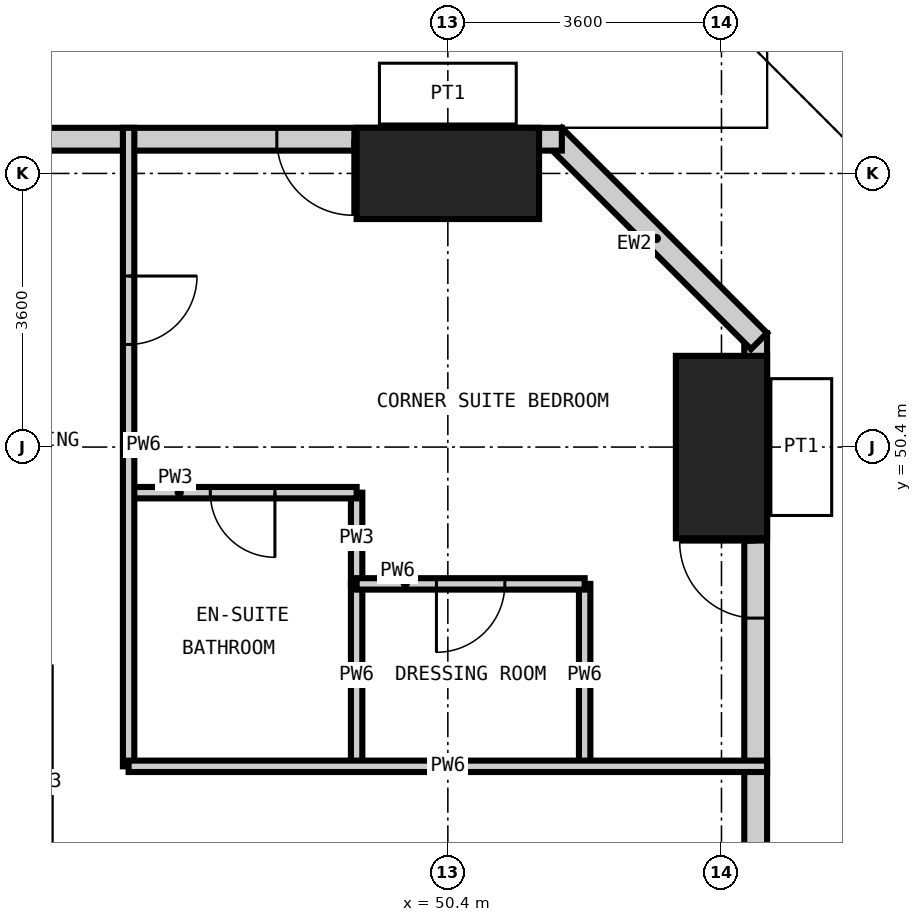
"""IFC4 building model, lengths in metres.
Left out: names, types, materials, properties, quantities, classifications, styles, units other than length and angle.
Written with IfcOpenShell. Run it as: python <this file> out.ifc"""

import sys

from ifc_helpers import new_model, si_unit, direction, frame, frame_2d, origin, origin_2d, place, context, subcontext, project, spatial, rectangle, extrude, element, fill, save


model = new_model("IFC4")
c1 = context("Model", 3, precision=1e-05, world=origin(), true_north=direction((0.0, 1.0)))
c2 = subcontext(c1, "Body", "Model", "MODEL_VIEW")
j1 = project(units=[si_unit("LENGTHUNIT", "METRE"), si_unit("PLANEANGLEUNIT", "RADIAN")], contexts=[c1])
p1 = place(None, origin())
s1 = spatial("IfcSite", under=j1, at=p1, CompositionType="ELEMENT")
p2 = place(p1, origin())
s2 = spatial("IfcBuilding", under=s1, at=p2, CompositionType="ELEMENT")
p3 = place(p2, frame((0.0, 0.0, 93.6)))
s3 = spatial("IfcBuildingStorey", under=s2, at=p3, CompositionType="ELEMENT", Elevation=93.6)
p4 = place(p3, frame((50.4, 54.0, -0.35), z_axis=(0.0, 0.0, 1.0), x_axis=(1.0, 0.0, 0.0)))
e1 = element("IfcColumn", 1, at=p4, inside=s3, PredefinedType="COLUMN", context=c2, shape_type="SweptSolid", body=[
    extrude(rectangle(XDim=2.4, YDim=1.2, at=origin_2d()), origin(), (0.0, 0.0, 1.0), 3.6),
])
p5 = place(p3, frame((54.0, 50.4, -0.35), z_axis=(0.0, 0.0, 1.0), x_axis=(1.0, 0.0, 0.0)))
e2 = element("IfcColumn", 2, at=p5, inside=s3, PredefinedType="COLUMN", context=c2, shape_type="SweptSolid", body=[
    extrude(rectangle(XDim=1.2, YDim=2.4, at=origin_2d()), origin(), (0.0, 0.0, 1.0), 3.6),
])
p6 = place(p3, frame((54.45, 2.7, 0.0), z_axis=(0.0, 0.0, 1.0), x_axis=(0.0, 1.0, 0.0)))
e3 = element("IfcWall", 3, at=p6, inside=s3, PredefinedType="SOLIDWALL", context=c2, shape_type="SweptSolid", body=[
    extrude(rectangle(XDim=49.2, YDim=0.3, at=frame_2d((24.6, 0.0))), origin(), (0.0, 0.0, 1.0), 3.25),
])
p7 = place(p6, frame((2.35, 0.0, 0.0)))
e4 = element("IfcOpeningElement", 4, at=p7, cuts=e3, PredefinedType="OPENING", context=c2, shape_type="SweptSolid", body=[
    extrude(rectangle(XDim=1.0, YDim=2.4, at=frame_2d((0.5, 1.2))), frame((0.0, 0.16, 0.0), z_axis=(0.0, -1.0, 0.0), x_axis=(1.0, 0.0, 0.0)), (0.0, 0.0, 1.0), 0.32),
])
p8 = place(p6, frame((0.3, 0.0, 0.6)))
e5 = element("IfcOpeningElement", 5, at=p8, cuts=e3, PredefinedType="OPENING", context=c2, shape_type="SweptSolid", body=[
    extrude(rectangle(XDim=1.8, YDim=2.1, at=frame_2d((0.9, 1.05))), frame((0.0, 0.16, 0.0), z_axis=(0.0, -1.0, 0.0), x_axis=(1.0, 0.0, 0.0)), (0.0, 0.0, 1.0), 0.32),
])
p9 = place(p6, frame((9.4, 0.0, 0.0)))
e6 = element("IfcOpeningElement", 6, at=p9, cuts=e3, PredefinedType="OPENING", context=c2, shape_type="SweptSolid", body=[
    extrude(rectangle(XDim=1.0, YDim=2.4, at=frame_2d((0.5, 1.2))), frame((0.0, 0.16, 0.0), z_axis=(0.0, -1.0, 0.0), x_axis=(1.0, 0.0, 0.0)), (0.0, 0.0, 1.0), 0.32),
])
p10 = place(p6, frame((7.0, 0.0, 0.6)))
e7 = element("IfcOpeningElement", 7, at=p10, cuts=e3, PredefinedType="OPENING", context=c2, shape_type="SweptSolid", body=[
    extrude(rectangle(XDim=1.8, YDim=2.1, at=frame_2d((0.9, 1.05))), frame((0.0, 0.16, 0.0), z_axis=(0.0, -1.0, 0.0), x_axis=(1.0, 0.0, 0.0)), (0.0, 0.0, 1.0), 0.32),
])
p11 = place(p6, frame((10.7, 0.0, 0.6)))
e8 = element("IfcOpeningElement", 8, at=p11, cuts=e3, PredefinedType="OPENING", context=c2, shape_type="SweptSolid", body=[
    extrude(rectangle(XDim=1.8, YDim=2.1, at=frame_2d((0.9, 1.05))), frame((0.0, 0.16, 0.0), z_axis=(0.0, -1.0, 0.0), x_axis=(1.0, 0.0, 0.0)), (0.0, 0.0, 1.0), 0.32),
])
p12 = place(p6, frame((17.8, 0.0, 0.0)))
e9 = element("IfcOpeningElement", 9, at=p12, cuts=e3, PredefinedType="OPENING", context=c2, shape_type="SweptSolid", body=[
    extrude(rectangle(XDim=1.0, YDim=2.4, at=frame_2d((0.5, 1.2))), frame((0.0, 0.16, 0.0), z_axis=(0.0, -1.0, 0.0), x_axis=(1.0, 0.0, 0.0)), (0.0, 0.0, 1.0), 0.32),
])
p13 = place(p6, frame((15.7, 0.0, 0.6)))
e10 = element("IfcOpeningElement", 10, at=p13, cuts=e3, PredefinedType="OPENING", context=c2, shape_type="SweptSolid", body=[
    extrude(rectangle(XDim=1.8, YDim=2.1, at=frame_2d((0.9, 1.05))), frame((0.0, 0.16, 0.0), z_axis=(0.0, -1.0, 0.0), x_axis=(1.0, 0.0, 0.0)), (0.0, 0.0, 1.0), 0.32),
])
p14 = place(p6, frame((19.4, 0.0, 0.6)))
e11 = element("IfcOpeningElement", 11, at=p14, cuts=e3, PredefinedType="OPENING", context=c2, shape_type="SweptSolid", body=[
    extrude(rectangle(XDim=1.8, YDim=2.1, at=frame_2d((0.9, 1.05))), frame((0.0, 0.16, 0.0), z_axis=(0.0, -1.0, 0.0), x_axis=(1.0, 0.0, 0.0)), (0.0, 0.0, 1.0), 0.32),
])
p15 = place(p6, frame((26.2, 0.0, 0.0)))
e12 = element("IfcOpeningElement", 12, at=p15, cuts=e3, PredefinedType="OPENING", context=c2, shape_type="SweptSolid", body=[
    extrude(rectangle(XDim=1.0, YDim=2.4, at=frame_2d((0.5, 1.2))), frame((0.0, 0.16, 0.0), z_axis=(0.0, -1.0, 0.0), x_axis=(1.0, 0.0, 0.0)), (0.0, 0.0, 1.0), 0.32),
])
p16 = place(p6, frame((23.8, 0.0, 0.6)))
e13 = element("IfcOpeningElement", 13, at=p16, cuts=e3, PredefinedType="OPENING", context=c2, shape_type="SweptSolid", body=[
    extrude(rectangle(XDim=1.8, YDim=2.1, at=frame_2d((0.9, 1.05))), frame((0.0, 0.16, 0.0), z_axis=(0.0, -1.0, 0.0), x_axis=(1.0, 0.0, 0.0)), (0.0, 0.0, 1.0), 0.32),
])
p17 = place(p6, frame((27.8, 0.0, 0.6)))
e14 = element("IfcOpeningElement", 14, at=p17, cuts=e3, PredefinedType="OPENING", context=c2, shape_type="SweptSolid", body=[
    extrude(rectangle(XDim=1.8, YDim=2.1, at=frame_2d((0.9, 1.05))), frame((0.0, 0.16, 0.0), z_axis=(0.0, -1.0, 0.0), x_axis=(1.0, 0.0, 0.0)), (0.0, 0.0, 1.0), 0.32),
])
p18 = place(p6, frame((34.6, 0.0, 0.0)))
e15 = element("IfcOpeningElement", 15, at=p18, cuts=e3, PredefinedType="OPENING", context=c2, shape_type="SweptSolid", body=[
    extrude(rectangle(XDim=1.0, YDim=2.4, at=frame_2d((0.5, 1.2))), frame((0.0, 0.16, 0.0), z_axis=(0.0, -1.0, 0.0), x_axis=(1.0, 0.0, 0.0)), (0.0, 0.0, 1.0), 0.32),
])
p19 = place(p6, frame((32.2, 0.0, 0.6)))
e16 = element("IfcOpeningElement", 16, at=p19, cuts=e3, PredefinedType="OPENING", context=c2, shape_type="SweptSolid", body=[
    extrude(rectangle(XDim=1.8, YDim=2.1, at=frame_2d((0.9, 1.05))), frame((0.0, 0.16, 0.0), z_axis=(0.0, -1.0, 0.0), x_axis=(1.0, 0.0, 0.0)), (0.0, 0.0, 1.0), 0.32),
])
p20 = place(p6, frame((35.9, 0.0, 0.6)))
e17 = element("IfcOpeningElement", 17, at=p20, cuts=e3, PredefinedType="OPENING", context=c2, shape_type="SweptSolid", body=[
    extrude(rectangle(XDim=1.8, YDim=2.1, at=frame_2d((0.9, 1.05))), frame((0.0, 0.16, 0.0), z_axis=(0.0, -1.0, 0.0), x_axis=(1.0, 0.0, 0.0)), (0.0, 0.0, 1.0), 0.32),
])
p21 = place(p6, frame((40.9, 0.0, 0.0)))
e18 = element("IfcOpeningElement", 18, at=p21, cuts=e3, PredefinedType="OPENING", context=c2, shape_type="SweptSolid", body=[
    extrude(rectangle(XDim=1.0, YDim=2.4, at=frame_2d((0.5, 1.2))), frame((0.0, 0.16, 0.0), z_axis=(0.0, -1.0, 0.0), x_axis=(1.0, 0.0, 0.0)), (0.0, 0.0, 1.0), 0.32),
])
p22 = place(p6, frame((45.45, 0.0, 0.0)))
e19 = element("IfcOpeningElement", 19, at=p22, cuts=e3, PredefinedType="OPENING", context=c2, shape_type="SweptSolid", body=[
    extrude(rectangle(XDim=1.0, YDim=2.4, at=frame_2d((0.5, 1.2))), frame((0.0, 0.16, 0.0), z_axis=(0.0, -1.0, 0.0), x_axis=(1.0, 0.0, 0.0)), (0.0, 0.0, 1.0), 0.32),
])
p23 = place(p3, frame((54.494, 51.794, 0.0), z_axis=(0.0, 0.0, 1.0), x_axis=(-0.707106781187, 0.707106781187, 0.0)))
e20 = element("IfcWall", 20, at=p23, inside=s3, PredefinedType="SOLIDWALL", context=c2, shape_type="SweptSolid", body=[
    extrude(rectangle(XDim=3.818, YDim=0.3, at=frame_2d((1.909, 0.0))), origin(), (0.0, 0.0, 1.0), 3.25),
])
p24 = place(p3, frame((51.9, 54.45, 0.0), z_axis=(0.0, 0.0, 1.0), x_axis=(-1.0, 0.0, 0.0)))
e21 = element("IfcWall", 21, at=p24, inside=s3, PredefinedType="SOLIDWALL", context=c2, shape_type="SweptSolid", body=[
    extrude(rectangle(XDim=49.2, YDim=0.3, at=frame_2d((24.6, 0.0))), origin(), (0.0, 0.0, 1.0), 3.25),
])
p25 = place(p24, frame((45.85, 0.0, 0.0)))
e22 = element("IfcOpeningElement", 22, at=p25, cuts=e21, PredefinedType="OPENING", context=c2, shape_type="SweptSolid", body=[
    extrude(rectangle(XDim=1.0, YDim=2.4, at=frame_2d((0.5, 1.2))), frame((0.0, 0.16, 0.0), z_axis=(0.0, -1.0, 0.0), x_axis=(1.0, 0.0, 0.0)), (0.0, 0.0, 1.0), 0.32),
])
p26 = place(p24, frame((47.1, 0.0, 0.6)))
e23 = element("IfcOpeningElement", 23, at=p26, cuts=e21, PredefinedType="OPENING", context=c2, shape_type="SweptSolid", body=[
    extrude(rectangle(XDim=1.8, YDim=2.1, at=frame_2d((0.9, 1.05))), frame((0.0, 0.16, 0.0), z_axis=(0.0, -1.0, 0.0), x_axis=(1.0, 0.0, 0.0)), (0.0, 0.0, 1.0), 0.32),
])
p27 = place(p24, frame((38.8, 0.0, 0.0)))
e24 = element("IfcOpeningElement", 24, at=p27, cuts=e21, PredefinedType="OPENING", context=c2, shape_type="SweptSolid", body=[
    extrude(rectangle(XDim=1.0, YDim=2.4, at=frame_2d((0.5, 1.2))), frame((0.0, 0.16, 0.0), z_axis=(0.0, -1.0, 0.0), x_axis=(1.0, 0.0, 0.0)), (0.0, 0.0, 1.0), 0.32),
])
p28 = place(p24, frame((40.4, 0.0, 0.6)))
e25 = element("IfcOpeningElement", 25, at=p28, cuts=e21, PredefinedType="OPENING", context=c2, shape_type="SweptSolid", body=[
    extrude(rectangle(XDim=1.8, YDim=2.1, at=frame_2d((0.9, 1.05))), frame((0.0, 0.16, 0.0), z_axis=(0.0, -1.0, 0.0), x_axis=(1.0, 0.0, 0.0)), (0.0, 0.0, 1.0), 0.32),
])
p29 = place(p24, frame((36.7, 0.0, 0.6)))
e26 = element("IfcOpeningElement", 26, at=p29, cuts=e21, PredefinedType="OPENING", context=c2, shape_type="SweptSolid", body=[
    extrude(rectangle(XDim=1.8, YDim=2.1, at=frame_2d((0.9, 1.05))), frame((0.0, 0.16, 0.0), z_axis=(0.0, -1.0, 0.0), x_axis=(1.0, 0.0, 0.0)), (0.0, 0.0, 1.0), 0.32),
])
p30 = place(p24, frame((30.4, 0.0, 0.0)))
e27 = element("IfcOpeningElement", 27, at=p30, cuts=e21, PredefinedType="OPENING", context=c2, shape_type="SweptSolid", body=[
    extrude(rectangle(XDim=1.0, YDim=2.4, at=frame_2d((0.5, 1.2))), frame((0.0, 0.16, 0.0), z_axis=(0.0, -1.0, 0.0), x_axis=(1.0, 0.0, 0.0)), (0.0, 0.0, 1.0), 0.32),
])
p31 = place(p24, frame((31.7, 0.0, 0.6)))
e28 = element("IfcOpeningElement", 28, at=p31, cuts=e21, PredefinedType="OPENING", context=c2, shape_type="SweptSolid", body=[
    extrude(rectangle(XDim=1.8, YDim=2.1, at=frame_2d((0.9, 1.05))), frame((0.0, 0.16, 0.0), z_axis=(0.0, -1.0, 0.0), x_axis=(1.0, 0.0, 0.0)), (0.0, 0.0, 1.0), 0.32),
])
p32 = place(p24, frame((28.0, 0.0, 0.6)))
e29 = element("IfcOpeningElement", 29, at=p32, cuts=e21, PredefinedType="OPENING", context=c2, shape_type="SweptSolid", body=[
    extrude(rectangle(XDim=1.8, YDim=2.1, at=frame_2d((0.9, 1.05))), frame((0.0, 0.16, 0.0), z_axis=(0.0, -1.0, 0.0), x_axis=(1.0, 0.0, 0.0)), (0.0, 0.0, 1.0), 0.32),
])
p33 = place(p24, frame((22.0, 0.0, 0.0)))
e30 = element("IfcOpeningElement", 30, at=p33, cuts=e21, PredefinedType="OPENING", context=c2, shape_type="SweptSolid", body=[
    extrude(rectangle(XDim=1.0, YDim=2.4, at=frame_2d((0.5, 1.2))), frame((0.0, 0.16, 0.0), z_axis=(0.0, -1.0, 0.0), x_axis=(1.0, 0.0, 0.0)), (0.0, 0.0, 1.0), 0.32),
])
p34 = place(p24, frame((23.6, 0.0, 0.6)))
e31 = element("IfcOpeningElement", 31, at=p34, cuts=e21, PredefinedType="OPENING", context=c2, shape_type="SweptSolid", body=[
    extrude(rectangle(XDim=1.8, YDim=2.1, at=frame_2d((0.9, 1.05))), frame((0.0, 0.16, 0.0), z_axis=(0.0, -1.0, 0.0), x_axis=(1.0, 0.0, 0.0)), (0.0, 0.0, 1.0), 0.32),
])
p35 = place(p24, frame((19.6, 0.0, 0.6)))
e32 = element("IfcOpeningElement", 32, at=p35, cuts=e21, PredefinedType="OPENING", context=c2, shape_type="SweptSolid", body=[
    extrude(rectangle(XDim=1.8, YDim=2.1, at=frame_2d((0.9, 1.05))), frame((0.0, 0.16, 0.0), z_axis=(0.0, -1.0, 0.0), x_axis=(1.0, 0.0, 0.0)), (0.0, 0.0, 1.0), 0.32),
])
p36 = place(p24, frame((13.6, 0.0, 0.0)))
e33 = element("IfcOpeningElement", 33, at=p36, cuts=e21, PredefinedType="OPENING", context=c2, shape_type="SweptSolid", body=[
    extrude(rectangle(XDim=1.0, YDim=2.4, at=frame_2d((0.5, 1.2))), frame((0.0, 0.16, 0.0), z_axis=(0.0, -1.0, 0.0), x_axis=(1.0, 0.0, 0.0)), (0.0, 0.0, 1.0), 0.32),
])
p37 = place(p24, frame((15.2, 0.0, 0.6)))
e34 = element("IfcOpeningElement", 34, at=p37, cuts=e21, PredefinedType="OPENING", context=c2, shape_type="SweptSolid", body=[
    extrude(rectangle(XDim=1.8, YDim=2.1, at=frame_2d((0.9, 1.05))), frame((0.0, 0.16, 0.0), z_axis=(0.0, -1.0, 0.0), x_axis=(1.0, 0.0, 0.0)), (0.0, 0.0, 1.0), 0.32),
])
p38 = place(p24, frame((11.5, 0.0, 0.6)))
e35 = element("IfcOpeningElement", 35, at=p38, cuts=e21, PredefinedType="OPENING", context=c2, shape_type="SweptSolid", body=[
    extrude(rectangle(XDim=1.8, YDim=2.1, at=frame_2d((0.9, 1.05))), frame((0.0, 0.16, 0.0), z_axis=(0.0, -1.0, 0.0), x_axis=(1.0, 0.0, 0.0)), (0.0, 0.0, 1.0), 0.32),
])
p39 = place(p24, frame((7.3, 0.0, 0.0)))
e36 = element("IfcOpeningElement", 36, at=p39, cuts=e21, PredefinedType="OPENING", context=c2, shape_type="SweptSolid", body=[
    extrude(rectangle(XDim=1.0, YDim=2.4, at=frame_2d((0.5, 1.2))), frame((0.0, 0.16, 0.0), z_axis=(0.0, -1.0, 0.0), x_axis=(1.0, 0.0, 0.0)), (0.0, 0.0, 1.0), 0.32),
])
p40 = place(p24, frame((2.75, 0.0, 0.0)))
e37 = element("IfcOpeningElement", 37, at=p40, cuts=e21, PredefinedType="OPENING", context=c2, shape_type="SweptSolid", body=[
    extrude(rectangle(XDim=1.0, YDim=2.4, at=frame_2d((0.5, 1.2))), frame((0.0, 0.16, 0.0), z_axis=(0.0, -1.0, 0.0), x_axis=(1.0, 0.0, 0.0)), (0.0, 0.0, 1.0), 0.32),
])
p41 = place(p3, frame((49.2, 48.6, 0.0), z_axis=(0.0, 0.0, 1.0), x_axis=(0.0, 1.0, 0.0)))
e38 = element("IfcWall", 38, at=p41, inside=s3, PredefinedType="PARTITIONING", context=c2, shape_type="SweptSolid", body=[
    extrude(rectangle(XDim=1.2, YDim=0.15, at=frame_2d((0.6, 0.0))), origin(), (0.0, 0.0, 1.0), 3.25),
])
p42 = place(p3, frame((46.2, 49.8, 0.0), z_axis=(0.0, 0.0, 1.0), x_axis=(1.0, 0.0, 0.0)))
e39 = element("IfcWall", 39, at=p42, inside=s3, PredefinedType="PARTITIONING", context=c2, shape_type="SweptSolid", body=[
    extrude(rectangle(XDim=3.0, YDim=0.15, at=frame_2d((1.5, 0.0))), origin(), (0.0, 0.0, 1.0), 3.25),
])
p43 = place(p42, frame((1.075, 0.0, 0.0)))
e40 = element("IfcOpeningElement", 40, at=p43, cuts=e39, PredefinedType="OPENING", context=c2, shape_type="SweptSolid", body=[
    extrude(rectangle(XDim=0.85, YDim=2.1, at=frame_2d((0.425, 1.05))), frame((0.0, 0.085, 0.0), z_axis=(0.0, -1.0, 0.0), x_axis=(1.0, 0.0, 0.0)), (0.0, 0.0, 1.0), 0.17),
])
p44 = place(p3, frame((46.2, 46.2, 0.0), z_axis=(0.0, 0.0, 1.0), x_axis=(0.0, 1.0, 0.0)))
e41 = element("IfcWall", 41, at=p44, inside=s3, PredefinedType="PARTITIONING", context=c2, shape_type="SweptSolid", body=[
    extrude(rectangle(XDim=8.4, YDim=0.15, at=frame_2d((4.2, 0.0))), origin(), (0.0, 0.0, 1.0), 3.25),
])
p45 = place(p44, frame((5.55, 0.0, 0.0)))
e42 = element("IfcOpeningElement", 42, at=p45, cuts=e41, PredefinedType="OPENING", context=c2, shape_type="SweptSolid", body=[
    extrude(rectangle(XDim=0.9, YDim=2.1, at=frame_2d((0.45, 1.05))), frame((0.0, 0.085, 0.0), z_axis=(0.0, -1.0, 0.0), x_axis=(1.0, 0.0, 0.0)), (0.0, 0.0, 1.0), 0.17),
])
for number, where, z_axis, x_axis in (
    (43, (49.2, 46.2, 0.0), (0.0, 0.0, 1.0), (0.0, 1.0, 0.0)),
    (44, (52.2, 46.2, 0.0), (0.0, 0.0, 1.0), (0.0, 1.0, 0.0)),
):
    element("IfcWall", number, at=place(p3, frame(where, z_axis=z_axis, x_axis=x_axis)), inside=s3, PredefinedType="PARTITIONING", context=c2, shape_type="SweptSolid", body=[
        extrude(rectangle(XDim=2.4, YDim=0.15, at=frame_2d((1.2, 0.0))), origin(), (0.0, 0.0, 1.0), 3.25),
    ])
p46 = place(p3, frame((46.2, 46.2, 0.0), z_axis=(0.0, 0.0, 1.0), x_axis=(1.0, 0.0, 0.0)))
e45 = element("IfcWall", 45, at=p46, inside=s3, PredefinedType="PARTITIONING", context=c2, shape_type="SweptSolid", body=[
    extrude(rectangle(XDim=8.4, YDim=0.15, at=frame_2d((4.2, 0.0))), origin(), (0.0, 0.0, 1.0), 3.25),
])
p47 = place(p3, frame((49.2, 48.6, 0.0), z_axis=(0.0, 0.0, 1.0), x_axis=(1.0, 0.0, 0.0)))
e46 = element("IfcWall", 46, at=p47, inside=s3, PredefinedType="PARTITIONING", context=c2, shape_type="SweptSolid", body=[
    extrude(rectangle(XDim=3.0, YDim=0.15, at=frame_2d((1.5, 0.0))), origin(), (0.0, 0.0, 1.0), 3.25),
])
p48 = place(p47, frame((1.05, 0.0, 0.0)))
e47 = element("IfcOpeningElement", 47, at=p48, cuts=e46, PredefinedType="OPENING", context=c2, shape_type="SweptSolid", body=[
    extrude(rectangle(XDim=0.9, YDim=2.1, at=frame_2d((0.45, 1.05))), frame((0.0, 0.085, 0.0), z_axis=(0.0, -1.0, 0.0), x_axis=(1.0, 0.0, 0.0)), (0.0, 0.0, 1.0), 0.17),
])
p49 = place(p22, origin())
e48 = element("IfcDoor", 48, at=p49, inside=s3, OperationType="SINGLE_SWING_RIGHT", PredefinedType="DOOR", context=c2, shape_type="SweptSolid", body=[
    extrude(rectangle(XDim=1.0, YDim=2.4, at=frame_2d((0.5, 1.2))), frame((0.0, 0.025, 0.0), z_axis=(0.0, -1.0, 0.0), x_axis=(1.0, 0.0, 0.0)), (0.0, 0.0, 1.0), 0.05),
])
fill(e19, e48)
p50 = place(p40, origin())
e49 = element("IfcDoor", 49, at=p50, inside=s3, OperationType="SINGLE_SWING_LEFT", PredefinedType="DOOR", context=c2, shape_type="SweptSolid", body=[
    extrude(rectangle(XDim=1.0, YDim=2.4, at=frame_2d((0.5, 1.2))), frame((0.0, 0.025, 0.0), z_axis=(0.0, -1.0, 0.0), x_axis=(1.0, 0.0, 0.0)), (0.0, 0.0, 1.0), 0.05),
])
fill(e37, e49)
p51 = place(p45, frame((0.9, 0.0, 0.0), z_axis=(0.0, 0.0, 1.0), x_axis=(-1.0, 0.0, 0.0)))
e50 = element("IfcDoor", 50, at=p51, inside=s3, OperationType="SINGLE_SWING_LEFT", PredefinedType="DOOR", context=c2, shape_type="SweptSolid", body=[
    extrude(rectangle(XDim=0.9, YDim=2.1, at=frame_2d((0.45, 1.05))), frame((0.0, 0.025, 0.0), z_axis=(0.0, -1.0, 0.0), x_axis=(1.0, 0.0, 0.0)), (0.0, 0.0, 1.0), 0.05),
])
fill(e42, e50)
p52 = place(p43, frame((0.85, 0.0, 0.0), z_axis=(0.0, 0.0, 1.0), x_axis=(-1.0, 0.0, 0.0)))
e51 = element("IfcDoor", 51, at=p52, inside=s3, OperationType="SINGLE_SWING_LEFT", PredefinedType="DOOR", context=c2, shape_type="SweptSolid", body=[
    extrude(rectangle(XDim=0.85, YDim=2.1, at=frame_2d((0.425, 1.05))), frame((0.0, 0.025, 0.0), z_axis=(0.0, -1.0, 0.0), x_axis=(1.0, 0.0, 0.0)), (0.0, 0.0, 1.0), 0.05),
])
fill(e40, e51)
p53 = place(p48, frame((0.9, 0.0, 0.0), z_axis=(0.0, 0.0, 1.0), x_axis=(-1.0, 0.0, 0.0)))
e52 = element("IfcDoor", 52, at=p53, inside=s3, OperationType="SINGLE_SWING_RIGHT", PredefinedType="DOOR", context=c2, shape_type="SweptSolid", body=[
    extrude(rectangle(XDim=0.9, YDim=2.1, at=frame_2d((0.45, 1.05))), frame((0.0, 0.025, 0.0), z_axis=(0.0, -1.0, 0.0), x_axis=(1.0, 0.0, 0.0)), (0.0, 0.0, 1.0), 0.05),
])
fill(e47, e52)
save(model, sys.argv[1])
